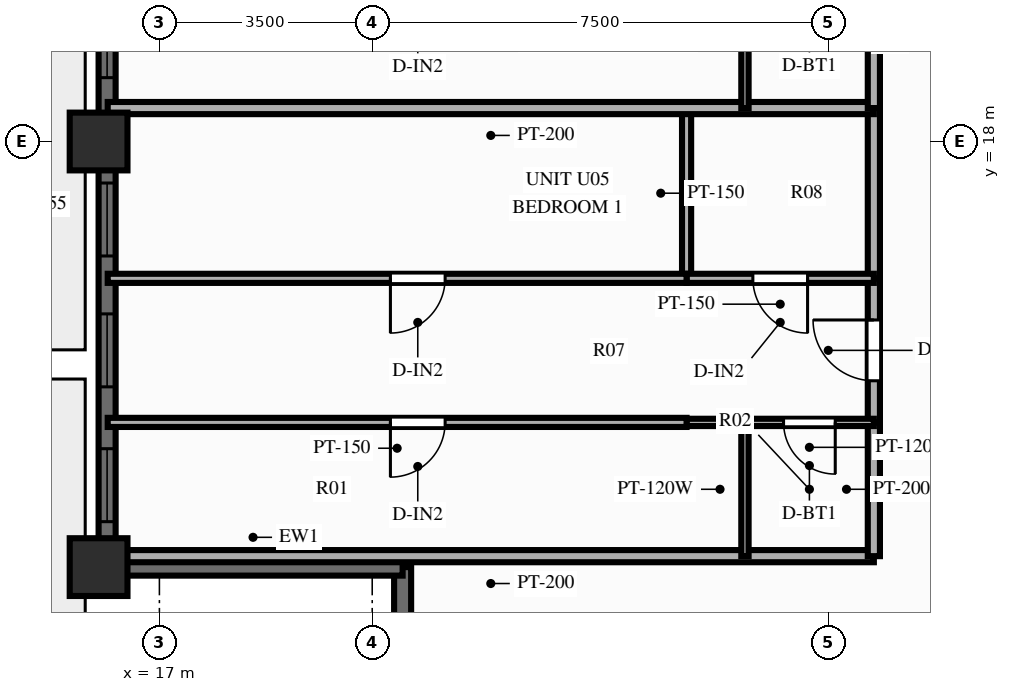
"""IFC4 building model, lengths in metres.
Left out: names, types, materials, properties, quantities, classifications, styles, units other than length and angle.
Written with IfcOpenShell. Run it as: python <this file> out.ifc"""

import sys

from ifc_helpers import new_model, si_unit, direction, frame, frame_2d, origin, origin_2d, place, context, subcontext, project, spatial, rectangle, extrude, source, transform, mapped, element, fill, save


model = new_model("IFC4")
c1 = context("Model", 3, precision=1e-05, world=origin(), true_north=direction((0.0, 1.0)))
c2 = subcontext(c1, "Body", "Model", "MODEL_VIEW")
j1 = project(units=[si_unit("LENGTHUNIT", "METRE"), si_unit("PLANEANGLEUNIT", "RADIAN")], contexts=[c1])
p1 = place(None, origin())
s1 = spatial("IfcSite", under=j1, at=p1, CompositionType="ELEMENT")
p2 = place(p1, origin())
s2 = spatial("IfcBuilding", under=s1, at=p2, CompositionType="ELEMENT")
p3 = place(p2, frame((0.0, 0.0, 152.2)))
s3 = spatial("IfcBuildingStorey", under=s2, at=p3, CompositionType="ELEMENT", Elevation=152.2)
m1 = source(origin(), c2, "Body", "SweptSolid", [
    extrude(rectangle(XDim=0.95, YDim=0.95, at=origin_2d()), origin(), (0.0, 0.0, 1.0), 3.9),
])
for number, where, z_axis, x_axis in (
    (1, (16.0, 18.0, 0.0), (0.0, 0.0, 1.0), (1.0, 0.0, 0.0)),
    (2, (16.0, 11.0, 0.0), (0.0, 0.0, 1.0), (1.0, 0.0, 0.0)),
):
    element("IfcColumn", number, at=place(p3, frame(where, z_axis=z_axis, x_axis=x_axis)), inside=s3, PredefinedType="COLUMN", context=c2, shape_type="MappedRepresentation", body=[
        mapped(m1, transform((0.0, 0.0, 0.0), scale=1.0)),
    ])
p4 = place(p3, frame((16.14, 11.0, 0.0), z_axis=(0.0, 0.0, 1.0), x_axis=(0.0, 1.0, 0.0)))
e3 = element("IfcWall", 3, at=p4, inside=s3, PredefinedType="SOLIDWALL", context=c2, shape_type="SweptSolid", body=[
    extrude(rectangle(XDim=32.0, YDim=0.28, at=frame_2d((16.0, 0.0))), origin(), (0.0, 0.0, 1.0), 2.44),
])
p5 = place(p4, frame((0.748, 0.0, 0.25)))
e4 = element("IfcOpeningElement", 4, at=p5, cuts=e3, PredefinedType="OPENING", context=c2, shape_type="SweptSolid", body=[
    extrude(rectangle(XDim=1.2, YDim=1.5, at=frame_2d((0.6, 0.75))), frame((0.0, 0.152, 0.0), z_axis=(0.0, -1.0, 0.0), x_axis=(1.0, 0.0, 0.0)), (0.0, 0.0, 1.0), 0.304),
])
p6 = place(p4, frame((2.965, 0.0, 0.25)))
e5 = element("IfcOpeningElement", 5, at=p6, cuts=e3, PredefinedType="OPENING", context=c2, shape_type="SweptSolid", body=[
    extrude(rectangle(XDim=1.2, YDim=1.5, at=frame_2d((0.6, 0.75))), frame((0.0, 0.152, 0.0), z_axis=(0.0, -1.0, 0.0), x_axis=(1.0, 0.0, 0.0)), (0.0, 0.0, 1.0), 0.304),
])
p7 = place(p4, frame((5.117, 0.0, 0.25)))
e6 = element("IfcOpeningElement", 6, at=p7, cuts=e3, PredefinedType="OPENING", context=c2, shape_type="SweptSolid", body=[
    extrude(rectangle(XDim=1.2, YDim=1.5, at=frame_2d((0.6, 0.75))), frame((0.0, 0.152, 0.0), z_axis=(0.0, -1.0, 0.0), x_axis=(1.0, 0.0, 0.0)), (0.0, 0.0, 1.0), 0.304),
])
p8 = place(p4, frame((8.05, 0.0, 0.25)))
e7 = element("IfcOpeningElement", 7, at=p8, cuts=e3, PredefinedType="OPENING", context=c2, shape_type="SweptSolid", body=[
    extrude(rectangle(XDim=1.2, YDim=1.5, at=frame_2d((0.6, 0.75))), frame((0.0, 0.152, 0.0), z_axis=(0.0, -1.0, 0.0), x_axis=(1.0, 0.0, 0.0)), (0.0, 0.0, 1.0), 0.304),
])
p9 = place(p4, frame((10.335, 0.0, 0.25)))
e8 = element("IfcOpeningElement", 8, at=p9, cuts=e3, PredefinedType="OPENING", context=c2, shape_type="SweptSolid", body=[
    extrude(rectangle(XDim=1.2, YDim=1.5, at=frame_2d((0.6, 0.75))), frame((0.0, 0.152, 0.0), z_axis=(0.0, -1.0, 0.0), x_axis=(1.0, 0.0, 0.0)), (0.0, 0.0, 1.0), 0.304),
])
p10 = place(p4, frame((12.92, 0.0, 0.25)))
e9 = element("IfcOpeningElement", 9, at=p10, cuts=e3, PredefinedType="OPENING", context=c2, shape_type="SweptSolid", body=[
    extrude(rectangle(XDim=1.2, YDim=1.5, at=frame_2d((0.6, 0.75))), frame((0.0, 0.152, 0.0), z_axis=(0.0, -1.0, 0.0), x_axis=(1.0, 0.0, 0.0)), (0.0, 0.0, 1.0), 0.304),
])
p11 = place(p4, frame((15.4, 0.0, 0.25)))
e10 = element("IfcOpeningElement", 10, at=p11, cuts=e3, PredefinedType="OPENING", context=c2, shape_type="SweptSolid", body=[
    extrude(rectangle(XDim=1.2, YDim=1.5, at=frame_2d((0.6, 0.75))), frame((0.0, 0.152, 0.0), z_axis=(0.0, -1.0, 0.0), x_axis=(1.0, 0.0, 0.0)), (0.0, 0.0, 1.0), 0.304),
])
p12 = place(p4, frame((17.58, 0.0, 0.25)))
e11 = element("IfcOpeningElement", 11, at=p12, cuts=e3, PredefinedType="OPENING", context=c2, shape_type="SweptSolid", body=[
    extrude(rectangle(XDim=1.2, YDim=1.5, at=frame_2d((0.6, 0.75))), frame((0.0, 0.152, 0.0), z_axis=(0.0, -1.0, 0.0), x_axis=(1.0, 0.0, 0.0)), (0.0, 0.0, 1.0), 0.304),
])
p13 = place(p4, frame((19.865, 0.0, 0.25)))
e12 = element("IfcOpeningElement", 12, at=p13, cuts=e3, PredefinedType="OPENING", context=c2, shape_type="SweptSolid", body=[
    extrude(rectangle(XDim=1.2, YDim=1.5, at=frame_2d((0.6, 0.75))), frame((0.0, 0.152, 0.0), z_axis=(0.0, -1.0, 0.0), x_axis=(1.0, 0.0, 0.0)), (0.0, 0.0, 1.0), 0.304),
])
p14 = place(p4, frame((22.45, 0.0, 0.25)))
e13 = element("IfcOpeningElement", 13, at=p14, cuts=e3, PredefinedType="OPENING", context=c2, shape_type="SweptSolid", body=[
    extrude(rectangle(XDim=1.2, YDim=1.5, at=frame_2d((0.6, 0.75))), frame((0.0, 0.152, 0.0), z_axis=(0.0, -1.0, 0.0), x_axis=(1.0, 0.0, 0.0)), (0.0, 0.0, 1.0), 0.304),
])
p15 = place(p4, frame((25.633, 0.0, 0.25)))
e14 = element("IfcOpeningElement", 14, at=p15, cuts=e3, PredefinedType="OPENING", context=c2, shape_type="SweptSolid", body=[
    extrude(rectangle(XDim=0.7, YDim=1.5, at=frame_2d((0.35, 0.75))), frame((0.0, 0.152, 0.0), z_axis=(0.0, -1.0, 0.0), x_axis=(1.0, 0.0, 0.0)), (0.0, 0.0, 1.0), 0.304),
])
p16 = place(p4, frame((27.235, 0.0, 0.25)))
e15 = element("IfcOpeningElement", 15, at=p16, cuts=e3, PredefinedType="OPENING", context=c2, shape_type="SweptSolid", body=[
    extrude(rectangle(XDim=1.2, YDim=1.5, at=frame_2d((0.6, 0.75))), frame((0.0, 0.152, 0.0), z_axis=(0.0, -1.0, 0.0), x_axis=(1.0, 0.0, 0.0)), (0.0, 0.0, 1.0), 0.304),
])
p17 = place(p4, frame((29.752, 0.0, 0.25)))
e16 = element("IfcOpeningElement", 16, at=p17, cuts=e3, PredefinedType="OPENING", context=c2, shape_type="SweptSolid", body=[
    extrude(rectangle(XDim=1.2, YDim=1.5, at=frame_2d((0.6, 0.75))), frame((0.0, 0.152, 0.0), z_axis=(0.0, -1.0, 0.0), x_axis=(1.0, 0.0, 0.0)), (0.0, 0.0, 1.0), 0.304),
])
for number, where, z_axis, x_axis in (
    (17, (21.0, 6.08, 0.0), (0.0, 0.0, 1.0), (0.0, 1.0, 0.0)),
    (18, (16.08, 11.0, 0.0), (0.0, 0.0, 1.0), (1.0, 0.0, 0.0)),
):
    element("IfcWall", number, at=place(p3, frame(where, z_axis=z_axis, x_axis=x_axis)), inside=s3, PredefinedType="SOLIDWALL", context=c2, shape_type="SweptSolid", body=[
        extrude(rectangle(XDim=4.92, YDim=0.28, at=frame_2d((2.46, 0.0))), origin(), (0.0, 0.0, 1.0), 2.44),
    ])
p18 = place(p3, frame((28.75, 11.18, 0.0), z_axis=(0.0, 0.0, 1.0), x_axis=(-1.0, 0.0, 0.0)))
e19 = element("IfcWall", 19, at=p18, inside=s3, PredefinedType="PARTITIONING", context=c2, shape_type="SweptSolid", body=[
    extrude(rectangle(XDim=12.6, YDim=0.2, at=frame_2d((6.3, 0.0))), origin(), (0.0, 0.0, 1.0), 3.56),
])
p19 = place(p3, frame((28.75, 11.18, 0.0), z_axis=(0.0, 0.0, 1.0), x_axis=(0.0, 1.0, 0.0)))
e20 = element("IfcWall", 20, at=p19, inside=s3, PredefinedType="PARTITIONING", context=c2, shape_type="SweptSolid", body=[
    extrude(rectangle(XDim=2.2, YDim=0.2, at=frame_2d((1.1, 0.0))), origin(), (0.0, 0.0, 1.0), 3.56),
])
p20 = place(p3, frame((28.75, 13.38, 0.0), z_axis=(0.0, 0.0, 1.0), x_axis=(0.0, 1.0, 0.0)))
e21 = element("IfcWall", 21, at=p20, inside=s3, PredefinedType="PARTITIONING", context=c2, shape_type="SweptSolid", body=[
    extrude(rectangle(XDim=2.37, YDim=0.2, at=frame_2d((1.185, 0.0))), origin(), (0.0, 0.0, 1.0), 3.56),
])
p21 = place(p20, frame((0.685, 0.0, 0.0)))
e22 = element("IfcOpeningElement", 22, at=p21, cuts=e21, PredefinedType="OPENING", context=c2, shape_type="SweptSolid", body=[
    extrude(rectangle(XDim=1.0, YDim=2.15, at=frame_2d((0.5, 1.075))), frame((0.0, 0.112, 0.0), z_axis=(0.0, -1.0, 0.0), x_axis=(1.0, 0.0, 0.0)), (0.0, 0.0, 1.0), 0.224),
])
p22 = place(p3, frame((28.75, 15.75, 0.0), z_axis=(0.0, 0.0, 1.0), x_axis=(0.0, 1.0, 0.0)))
e23 = element("IfcWall", 23, at=p22, inside=s3, PredefinedType="PARTITIONING", context=c2, shape_type="SweptSolid", body=[
    extrude(rectangle(XDim=2.801, YDim=0.2, at=frame_2d((1.4, 0.0))), origin(), (0.0, 0.0, 1.0), 3.56),
])
p23 = place(p3, frame((26.63, 11.18, 0.0), z_axis=(0.0, 0.0, 1.0), x_axis=(0.0, 1.0, 0.0)))
e24 = element("IfcWall", 24, at=p23, inside=s3, PredefinedType="PARTITIONING", context=c2, shape_type="SweptSolid", body=[
    extrude(rectangle(XDim=2.2, YDim=0.12, at=frame_2d((1.1, 0.0))), origin(), (0.0, 0.0, 1.0), 3.56),
])
p24 = place(p3, frame((25.67, 15.75, 0.0), z_axis=(0.0, 0.0, 1.0), x_axis=(0.0, 1.0, 0.0)))
e25 = element("IfcWall", 25, at=p24, inside=s3, PredefinedType="PARTITIONING", context=c2, shape_type="SweptSolid", body=[
    extrude(rectangle(XDim=2.801, YDim=0.15, at=frame_2d((1.4, 0.0))), origin(), (0.0, 0.0, 1.0), 3.56),
])
p25 = place(p3, frame((28.75, 13.38, 0.0), z_axis=(0.0, 0.0, 1.0), x_axis=(-1.0, 0.0, 0.0)))
e26 = element("IfcWall", 26, at=p25, inside=s3, PredefinedType="PARTITIONING", context=c2, shape_type="SweptSolid", body=[
    extrude(rectangle(XDim=2.12, YDim=0.12, at=frame_2d((1.06, 0.0))), origin(), (0.0, 0.0, 1.0), 3.56),
])
p26 = place(p25, frame((0.635, 0.0, 0.0)))
e27 = element("IfcOpeningElement", 27, at=p26, cuts=e26, PredefinedType="OPENING", context=c2, shape_type="SweptSolid", body=[
    extrude(rectangle(XDim=0.85, YDim=2.05, at=frame_2d((0.425, 1.025))), frame((0.0, 0.072, 0.0), z_axis=(0.0, -1.0, 0.0), x_axis=(1.0, 0.0, 0.0)), (0.0, 0.0, 1.0), 0.144),
])
p27 = place(p3, frame((26.63, 13.38, 0.0), z_axis=(0.0, 0.0, 1.0), x_axis=(-1.0, 0.0, 0.0)))
e28 = element("IfcWall", 28, at=p27, inside=s3, PredefinedType="PARTITIONING", context=c2, shape_type="SweptSolid", body=[
    extrude(rectangle(XDim=0.96, YDim=0.12, at=frame_2d((0.48, 0.0))), origin(), (0.0, 0.0, 1.0), 3.56),
])
p28 = place(p3, frame((25.67, 13.38, 0.0), z_axis=(0.0, 0.0, 1.0), x_axis=(-1.0, 0.0, 0.0)))
e29 = element("IfcWall", 29, at=p28, inside=s3, PredefinedType="PARTITIONING", context=c2, shape_type="SweptSolid", body=[
    extrude(rectangle(XDim=9.52, YDim=0.15, at=frame_2d((4.76, 0.0))), origin(), (0.0, 0.0, 1.0), 3.56),
])
p29 = place(p28, frame((3.971, 0.0, 0.0)))
e30 = element("IfcOpeningElement", 30, at=p29, cuts=e29, PredefinedType="OPENING", context=c2, shape_type="SweptSolid", body=[
    extrude(rectangle(XDim=0.9, YDim=2.1, at=frame_2d((0.45, 1.05))), frame((0.0, 0.087, 0.0), z_axis=(0.0, -1.0, 0.0), x_axis=(1.0, 0.0, 0.0)), (0.0, 0.0, 1.0), 0.174),
])
p30 = place(p3, frame((28.75, 15.75, 0.0), z_axis=(0.0, 0.0, 1.0), x_axis=(-1.0, 0.0, 0.0)))
e31 = element("IfcWall", 31, at=p30, inside=s3, PredefinedType="PARTITIONING", context=c2, shape_type="SweptSolid", body=[
    extrude(rectangle(XDim=3.08, YDim=0.15, at=frame_2d((1.54, 0.0))), origin(), (0.0, 0.0, 1.0), 3.56),
])
p31 = place(p30, frame((1.09, 0.0, 0.0)))
e32 = element("IfcOpeningElement", 32, at=p31, cuts=e31, PredefinedType="OPENING", context=c2, shape_type="SweptSolid", body=[
    extrude(rectangle(XDim=0.9, YDim=2.1, at=frame_2d((0.45, 1.05))), frame((0.0, 0.087, 0.0), z_axis=(0.0, -1.0, 0.0), x_axis=(1.0, 0.0, 0.0)), (0.0, 0.0, 1.0), 0.174),
])
p32 = place(p3, frame((25.67, 15.75, 0.0), z_axis=(0.0, 0.0, 1.0), x_axis=(-1.0, 0.0, 0.0)))
e33 = element("IfcWall", 33, at=p32, inside=s3, PredefinedType="PARTITIONING", context=c2, shape_type="SweptSolid", body=[
    extrude(rectangle(XDim=9.52, YDim=0.15, at=frame_2d((4.76, 0.0))), origin(), (0.0, 0.0, 1.0), 3.56),
])
p33 = place(p32, frame((3.971, 0.0, 0.0)))
e34 = element("IfcOpeningElement", 34, at=p33, cuts=e33, PredefinedType="OPENING", context=c2, shape_type="SweptSolid", body=[
    extrude(rectangle(XDim=0.9, YDim=2.1, at=frame_2d((0.45, 1.05))), frame((0.0, 0.087, 0.0), z_axis=(0.0, -1.0, 0.0), x_axis=(1.0, 0.0, 0.0)), (0.0, 0.0, 1.0), 0.174),
])
p34 = place(p3, frame((28.75, 18.55, 0.0), z_axis=(0.0, 0.0, 1.0), x_axis=(-1.0, 0.0, 0.0)))
e35 = element("IfcWall", 35, at=p34, inside=s3, PredefinedType="PARTITIONING", context=c2, shape_type="SweptSolid", body=[
    extrude(rectangle(XDim=12.6, YDim=0.2, at=frame_2d((6.3, 0.0))), origin(), (0.0, 0.0, 1.0), 3.56),
])
p35 = place(p3, frame((28.75, 18.55, 0.0), z_axis=(0.0, 0.0, 1.0), x_axis=(0.0, 1.0, 0.0)))
e36 = element("IfcWall", 36, at=p35, inside=s3, PredefinedType="PARTITIONING", context=c2, shape_type="SweptSolid", body=[
    extrude(rectangle(XDim=2.2, YDim=0.2, at=frame_2d((1.1, 0.0))), origin(), (0.0, 0.0, 1.0), 3.56),
])
p36 = place(p3, frame((26.63, 18.55, 0.0), z_axis=(0.0, 0.0, 1.0), x_axis=(0.0, 1.0, 0.0)))
e37 = element("IfcWall", 37, at=p36, inside=s3, PredefinedType="PARTITIONING", context=c2, shape_type="SweptSolid", body=[
    extrude(rectangle(XDim=2.2, YDim=0.12, at=frame_2d((1.1, 0.0))), origin(), (0.0, 0.0, 1.0), 3.56),
])
m2 = source(origin(), c2, "Body", "SweptSolid", [
    extrude(rectangle(XDim=1.2, YDim=1.5, at=frame_2d((0.6, 0.75))), frame((0.0, 0.03, 0.0), z_axis=(0.0, -1.0, 0.0), x_axis=(1.0, 0.0, 0.0)), (0.0, 0.0, 1.0), 0.06),
])
p37 = place(p5, origin())
e38 = element("IfcWindow", 38, at=p37, inside=s3, PartitioningType="SINGLE_PANEL", PredefinedType="WINDOW", context=c2, shape_type="MappedRepresentation", body=[
    mapped(m2, transform((0.0, 0.0, 0.0), scale=1.0)),
])
fill(e4, e38)
p38 = place(p6, origin())
e39 = element("IfcWindow", 39, at=p38, inside=s3, PartitioningType="SINGLE_PANEL", PredefinedType="WINDOW", context=c2, shape_type="MappedRepresentation", body=[
    mapped(m2, transform((0.0, 0.0, 0.0), scale=1.0)),
])
fill(e5, e39)
p39 = place(p7, origin())
e40 = element("IfcWindow", 40, at=p39, inside=s3, PartitioningType="SINGLE_PANEL", PredefinedType="WINDOW", context=c2, shape_type="MappedRepresentation", body=[
    mapped(m2, transform((0.0, 0.0, 0.0), scale=1.0)),
])
fill(e6, e40)
p40 = place(p8, origin())
e41 = element("IfcWindow", 41, at=p40, inside=s3, PartitioningType="SINGLE_PANEL", PredefinedType="WINDOW", context=c2, shape_type="MappedRepresentation", body=[
    mapped(m2, transform((0.0, 0.0, 0.0), scale=1.0)),
])
fill(e7, e41)
m3 = source(origin(), c2, "Body", "SweptSolid", [
    extrude(rectangle(XDim=1.0, YDim=2.15, at=frame_2d((0.5, 1.075))), frame((0.0, 0.025, 0.0), z_axis=(0.0, -1.0, 0.0), x_axis=(1.0, 0.0, 0.0)), (0.0, 0.0, 1.0), 0.05),
])
p41 = place(p21, origin())
e42 = element("IfcDoor", 42, at=p41, inside=s3, OperationType="SINGLE_SWING_RIGHT", PredefinedType="DOOR", context=c2, shape_type="MappedRepresentation", body=[
    mapped(m3, transform((0.0, 0.0, 0.0), scale=1.0)),
])
fill(e22, e42)
m4 = source(origin(), c2, "Body", "SweptSolid", [
    extrude(rectangle(XDim=0.85, YDim=2.05, at=frame_2d((0.425, 1.025))), frame((0.0, 0.025, 0.0), z_axis=(0.0, -1.0, 0.0), x_axis=(1.0, 0.0, 0.0)), (0.0, 0.0, 1.0), 0.05),
])
p42 = place(p26, origin())
e43 = element("IfcDoor", 43, at=p42, inside=s3, OperationType="SINGLE_SWING_LEFT", PredefinedType="DOOR", context=c2, shape_type="MappedRepresentation", body=[
    mapped(m4, transform((0.0, 0.0, 0.0), scale=1.0)),
])
fill(e27, e43)
m5 = source(origin(), c2, "Body", "SweptSolid", [
    extrude(rectangle(XDim=0.9, YDim=2.1, at=frame_2d((0.45, 1.05))), frame((0.0, 0.025, 0.0), z_axis=(0.0, -1.0, 0.0), x_axis=(1.0, 0.0, 0.0)), (0.0, 0.0, 1.0), 0.05),
])
p43 = place(p29, origin())
e44 = element("IfcDoor", 44, at=p43, inside=s3, OperationType="SINGLE_SWING_RIGHT", PredefinedType="DOOR", context=c2, shape_type="MappedRepresentation", body=[
    mapped(m5, transform((0.0, 0.0, 0.0), scale=1.0)),
])
fill(e30, e44)
p44 = place(p31, origin())
e45 = element("IfcDoor", 45, at=p44, inside=s3, OperationType="SINGLE_SWING_LEFT", PredefinedType="DOOR", context=c2, shape_type="MappedRepresentation", body=[
    mapped(m5, transform((0.0, 0.0, 0.0), scale=1.0)),
])
fill(e32, e45)
p45 = place(p33, origin())
e46 = element("IfcDoor", 46, at=p45, inside=s3, OperationType="SINGLE_SWING_RIGHT", PredefinedType="DOOR", context=c2, shape_type="MappedRepresentation", body=[
    mapped(m5, transform((0.0, 0.0, 0.0), scale=1.0)),
])
fill(e34, e46)
save(model, sys.argv[1])
